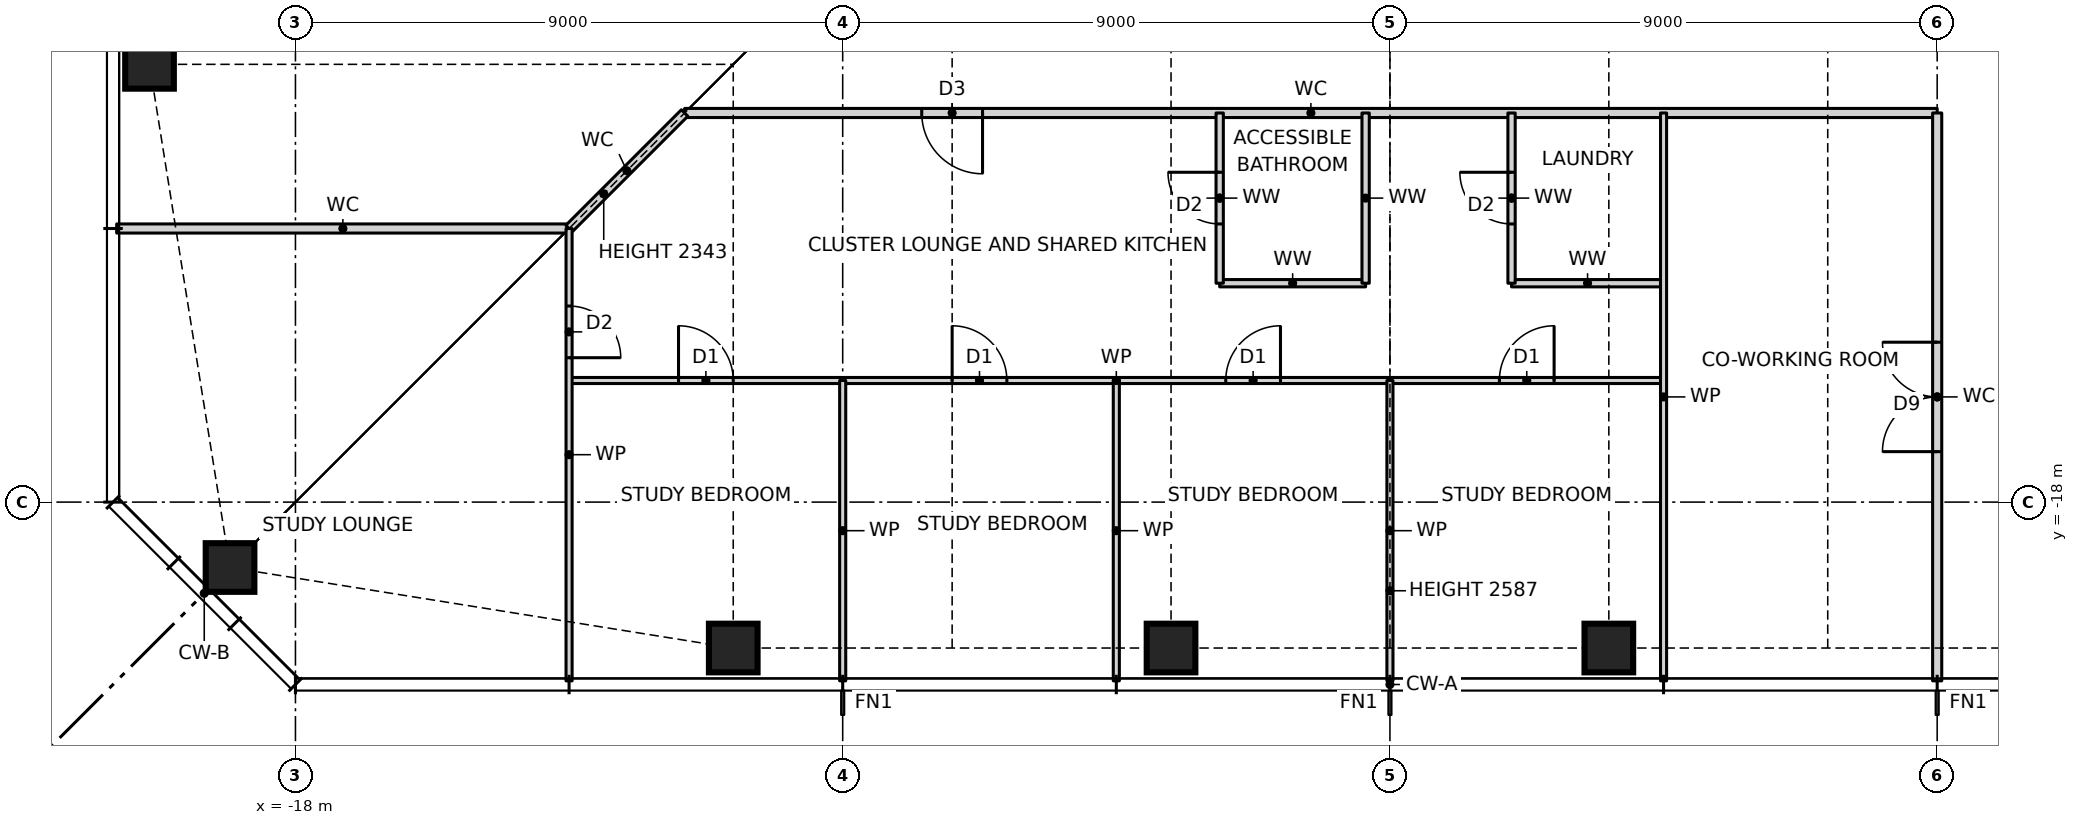
"""IFC4 building model, lengths in metres.
Left out: names, types, materials, properties, quantities, classifications, styles, units other than length and angle.
Written with IfcOpenShell. Run it as: python <this file> out.ifc"""

import sys

from ifc_helpers import new_model, si_unit, direction, frame, frame_2d, origin, origin_2d, place, context, subcontext, project, spatial, rectangle, hollow_rectangle, extrude, element, fill, save


model = new_model("IFC4")
c1 = context("Model", 3, precision=1e-05, world=origin(), true_north=direction((0.0, 1.0)))
c2 = subcontext(c1, "Body", "Model", "MODEL_VIEW")
j1 = project(units=[si_unit("LENGTHUNIT", "METRE"), si_unit("PLANEANGLEUNIT", "RADIAN")], contexts=[c1])
p1 = place(None, origin())
s1 = spatial("IfcSite", under=j1, at=p1, CompositionType="ELEMENT")
p2 = place(p1, origin())
s2 = spatial("IfcBuilding", under=s1, at=p2, CompositionType="ELEMENT")
p3 = place(p2, frame((0.0, 0.0, 122.5)))
s3 = spatial("IfcBuildingStorey", under=s2, at=p3, CompositionType="ELEMENT", Elevation=122.5)
for number, where, z_axis, x_axis in (
    (1, (-19.076, -19.076, 0.0), (0.0, 0.0, 1.0), (1.0, 0.0, 0.0)),
    (2, (-10.8, -20.4, 0.0), (0.0, 0.0, 1.0), (1.0, 0.0, 0.0)),
    (3, (-3.6, -20.4, 0.0), (0.0, 0.0, 1.0), (1.0, 0.0, 0.0)),
    (4, (3.6, -20.4, 0.0), (0.0, 0.0, 1.0), (1.0, 0.0, 0.0)),
    (5, (-20.4, -10.8, 0.0), (0.0, 0.0, 1.0), (1.0, 0.0, 0.0)),
):
    element("IfcColumn", number, at=place(p3, frame(where, z_axis=z_axis, x_axis=x_axis)), inside=s3, PredefinedType="COLUMN", context=c2, shape_type="SweptSolid", body=[
        extrude(hollow_rectangle(XDim=0.8, YDim=0.8, WallThickness=0.07, at=origin_2d()), origin(), (0.0, 0.0, 1.0), 3.5),
    ])
p4 = place(p3, frame((-13.5, -16.0, 0.0), z_axis=(0.0, 0.0, 1.0), x_axis=(1.0, 0.0, 0.0)))
e6 = element("IfcWall", 6, at=p4, inside=s3, PredefinedType="PARTITIONING", context=c2, shape_type="SweptSolid", body=[
    extrude(rectangle(XDim=18.0, YDim=0.1, at=frame_2d((9.0, 0.0))), origin(), (0.0, 0.0, 1.0), 3.27),
])
p5 = place(p4, frame((1.8, 0.0, 0.0)))
e7 = element("IfcOpeningElement", 7, at=p5, cuts=e6, PredefinedType="OPENING", context=c2, shape_type="SweptSolid", body=[
    extrude(rectangle(XDim=0.9, YDim=2.1, at=frame_2d((0.45, 1.05))), frame((0.0, 0.06, 0.0), z_axis=(0.0, -1.0, 0.0), x_axis=(1.0, 0.0, 0.0)), (0.0, 0.0, 1.0), 0.12),
])
p6 = place(p4, frame((6.3, 0.0, 0.0)))
e8 = element("IfcOpeningElement", 8, at=p6, cuts=e6, PredefinedType="OPENING", context=c2, shape_type="SweptSolid", body=[
    extrude(rectangle(XDim=0.9, YDim=2.1, at=frame_2d((0.45, 1.05))), frame((0.0, 0.06, 0.0), z_axis=(0.0, -1.0, 0.0), x_axis=(1.0, 0.0, 0.0)), (0.0, 0.0, 1.0), 0.12),
])
p7 = place(p4, frame((10.8, 0.0, 0.0)))
e9 = element("IfcOpeningElement", 9, at=p7, cuts=e6, PredefinedType="OPENING", context=c2, shape_type="SweptSolid", body=[
    extrude(rectangle(XDim=0.9, YDim=2.1, at=frame_2d((0.45, 1.05))), frame((0.0, 0.06, 0.0), z_axis=(0.0, -1.0, 0.0), x_axis=(1.0, 0.0, 0.0)), (0.0, 0.0, 1.0), 0.12),
])
p8 = place(p4, frame((15.3, 0.0, 0.0)))
e10 = element("IfcOpeningElement", 10, at=p8, cuts=e6, PredefinedType="OPENING", context=c2, shape_type="SweptSolid", body=[
    extrude(rectangle(XDim=0.9, YDim=2.1, at=frame_2d((0.45, 1.05))), frame((0.0, 0.06, 0.0), z_axis=(0.0, -1.0, 0.0), x_axis=(1.0, 0.0, 0.0)), (0.0, 0.0, 1.0), 0.12),
])
p9 = place(p3, frame((-2.8, -14.4, 0.0), z_axis=(0.0, 0.0, 1.0), x_axis=(1.0, 0.0, 0.0)))
e11 = element("IfcWall", 11, at=p9, inside=s3, PredefinedType="PARTITIONING", context=c2, shape_type="SweptSolid", body=[
    extrude(rectangle(XDim=2.4, YDim=0.12, at=frame_2d((1.2, 0.0))), origin(), (0.0, 0.0, 1.0), 3.27),
])
p10 = place(p3, frame((2.0, -14.4, 0.0), z_axis=(0.0, 0.0, 1.0), x_axis=(1.0, 0.0, 0.0)))
e12 = element("IfcWall", 12, at=p10, inside=s3, PredefinedType="PARTITIONING", context=c2, shape_type="SweptSolid", body=[
    extrude(rectangle(XDim=2.5, YDim=0.12, at=frame_2d((1.25, 0.0))), origin(), (0.0, 0.0, 1.0), 3.27),
])
p11 = place(p3, frame((-20.94, -13.5, 0.0), z_axis=(0.0, 0.0, 1.0), x_axis=(1.0, 0.0, 0.0)))
e13 = element("IfcWall", 13, at=p11, inside=s3, PredefinedType="PARTITIONING", context=c2, shape_type="SweptSolid", body=[
    extrude(rectangle(XDim=7.44, YDim=0.15, at=frame_2d((3.72, 0.0))), origin(), (0.0, 0.0, 1.0), 3.27),
])
p12 = place(p3, frame((-11.6, -11.6, 0.0), z_axis=(0.0, 0.0, 1.0), x_axis=(1.0, 0.0, 0.0)))
e14 = element("IfcWall", 14, at=p12, inside=s3, PredefinedType="PARTITIONING", context=c2, shape_type="SweptSolid", body=[
    extrude(rectangle(XDim=20.6, YDim=0.15, at=frame_2d((10.3, 0.0))), origin(), (0.0, 0.0, 1.0), 3.27),
])
p13 = place(p12, frame((3.9, 0.0, 0.0)))
e15 = element("IfcOpeningElement", 15, at=p13, cuts=e14, PredefinedType="OPENING", context=c2, shape_type="SweptSolid", body=[
    extrude(rectangle(XDim=1.0, YDim=2.1, at=frame_2d((0.5, 1.05))), frame((0.0, 0.085, 0.0), z_axis=(0.0, -1.0, 0.0), x_axis=(1.0, 0.0, 0.0)), (0.0, 0.0, 1.0), 0.17),
])
p14 = place(p3, frame((-13.5, -13.5, 0.0), z_axis=(0.0, 0.0, 1.0), x_axis=(0.707106781187, 0.707106781187, 0.0)))
e16 = element("IfcWall", 16, at=p14, inside=s3, PredefinedType="PARTITIONING", context=c2, shape_type="SweptSolid", body=[
    extrude(rectangle(XDim=2.687, YDim=0.15, at=frame_2d((1.343, 0.0))), origin(), (0.0, 0.0, 1.0), 2.343),
])
p15 = place(p3, frame((9.0, -20.94, 0.0), z_axis=(0.0, 0.0, 1.0), x_axis=(0.0, 1.0, 0.0)))
e17 = element("IfcWall", 17, at=p15, inside=s3, PredefinedType="PARTITIONING", context=c2, shape_type="SweptSolid", body=[
    extrude(rectangle(XDim=9.34, YDim=0.15, at=frame_2d((4.67, 0.0))), origin(), (0.0, 0.0, 1.0), 3.27),
])
p16 = place(p15, frame((3.77, 0.0, 0.0)))
e18 = element("IfcOpeningElement", 18, at=p16, cuts=e17, PredefinedType="OPENING", context=c2, shape_type="SweptSolid", body=[
    extrude(rectangle(XDim=1.8, YDim=2.1, at=frame_2d((0.9, 1.05))), frame((0.0, 0.085, 0.0), z_axis=(0.0, -1.0, 0.0), x_axis=(1.0, 0.0, 0.0)), (0.0, 0.0, 1.0), 0.17),
])
p17 = place(p3, frame((4.5, -20.94, 0.0), z_axis=(0.0, 0.0, 1.0), x_axis=(0.0, 1.0, 0.0)))
e19 = element("IfcWall", 19, at=p17, inside=s3, PredefinedType="PARTITIONING", context=c2, shape_type="SweptSolid", body=[
    extrude(rectangle(XDim=9.34, YDim=0.1, at=frame_2d((4.67, 0.0))), origin(), (0.0, 0.0, 1.0), 3.27),
])
p18 = place(p3, frame((2.0, -14.4, 0.0), z_axis=(0.0, 0.0, 1.0), x_axis=(0.0, 1.0, 0.0)))
e20 = element("IfcWall", 20, at=p18, inside=s3, PredefinedType="PARTITIONING", context=c2, shape_type="SweptSolid", body=[
    extrude(rectangle(XDim=2.8, YDim=0.12, at=frame_2d((1.4, 0.0))), origin(), (0.0, 0.0, 1.0), 3.27),
])
p19 = place(p18, frame((0.975, 0.0, 0.0)))
e21 = element("IfcOpeningElement", 21, at=p19, cuts=e20, PredefinedType="OPENING", context=c2, shape_type="SweptSolid", body=[
    extrude(rectangle(XDim=0.85, YDim=2.1, at=frame_2d((0.425, 1.05))), frame((0.0, 0.07, 0.0), z_axis=(0.0, -1.0, 0.0), x_axis=(1.0, 0.0, 0.0)), (0.0, 0.0, 1.0), 0.14),
])
p20 = place(p3, frame((0.0, -20.94, 0.0), z_axis=(0.0, 0.0, 1.0), x_axis=(0.0, 1.0, 0.0)))
e22 = element("IfcWall", 22, at=p20, inside=s3, PredefinedType="PARTITIONING", context=c2, shape_type="SweptSolid", body=[
    extrude(rectangle(XDim=4.94, YDim=0.1, at=frame_2d((2.47, 0.0))), origin(), (0.0, 0.0, 1.0), 2.587),
])
p21 = place(p3, frame((-0.4, -14.4, 0.0), z_axis=(0.0, 0.0, 1.0), x_axis=(0.0, 1.0, 0.0)))
e23 = element("IfcWall", 23, at=p21, inside=s3, PredefinedType="PARTITIONING", context=c2, shape_type="SweptSolid", body=[
    extrude(rectangle(XDim=2.8, YDim=0.12, at=frame_2d((1.4, 0.0))), origin(), (0.0, 0.0, 1.0), 3.27),
])
p22 = place(p3, frame((-2.8, -14.4, 0.0), z_axis=(0.0, 0.0, 1.0), x_axis=(0.0, 1.0, 0.0)))
e24 = element("IfcWall", 24, at=p22, inside=s3, PredefinedType="PARTITIONING", context=c2, shape_type="SweptSolid", body=[
    extrude(rectangle(XDim=2.8, YDim=0.12, at=frame_2d((1.4, 0.0))), origin(), (0.0, 0.0, 1.0), 3.27),
])
p23 = place(p22, frame((0.975, 0.0, 0.0)))
e25 = element("IfcOpeningElement", 25, at=p23, cuts=e24, PredefinedType="OPENING", context=c2, shape_type="SweptSolid", body=[
    extrude(rectangle(XDim=0.85, YDim=2.1, at=frame_2d((0.425, 1.05))), frame((0.0, 0.07, 0.0), z_axis=(0.0, -1.0, 0.0), x_axis=(1.0, 0.0, 0.0)), (0.0, 0.0, 1.0), 0.14),
])
for number, where, z_axis, x_axis in (
    (26, (-4.5, -20.94, 0.0), (0.0, 0.0, 1.0), (0.0, 1.0, 0.0)),
    (27, (-9.0, -20.94, 0.0), (0.0, 0.0, 1.0), (0.0, 1.0, 0.0)),
):
    element("IfcWall", number, at=place(p3, frame(where, z_axis=z_axis, x_axis=x_axis)), inside=s3, PredefinedType="PARTITIONING", context=c2, shape_type="SweptSolid", body=[
        extrude(rectangle(XDim=4.94, YDim=0.1, at=frame_2d((2.47, 0.0))), origin(), (0.0, 0.0, 1.0), 3.27),
    ])
p24 = place(p3, frame((-13.5, -20.94, 0.0), z_axis=(0.0, 0.0, 1.0), x_axis=(0.0, 1.0, 0.0)))
e28 = element("IfcWall", 28, at=p24, inside=s3, PredefinedType="PARTITIONING", context=c2, shape_type="SweptSolid", body=[
    extrude(rectangle(XDim=7.44, YDim=0.1, at=frame_2d((3.72, 0.0))), origin(), (0.0, 0.0, 1.0), 3.27),
])
p25 = place(p24, frame((5.315, 0.0, 0.0)))
e29 = element("IfcOpeningElement", 29, at=p25, cuts=e28, PredefinedType="OPENING", context=c2, shape_type="SweptSolid", body=[
    extrude(rectangle(XDim=0.85, YDim=2.1, at=frame_2d((0.425, 1.05))), frame((0.0, 0.06, 0.0), z_axis=(0.0, -1.0, 0.0), x_axis=(1.0, 0.0, 0.0)), (0.0, 0.0, 1.0), 0.12),
])
p26 = place(p5, origin())
e30 = element("IfcDoor", 30, at=p26, inside=s3, OperationType="SINGLE_SWING_LEFT", PredefinedType="DOOR", context=c2, shape_type="SweptSolid", body=[
    extrude(rectangle(XDim=0.9, YDim=2.1, at=frame_2d((0.45, 1.05))), frame((0.0, 0.025, 0.0), z_axis=(0.0, -1.0, 0.0), x_axis=(1.0, 0.0, 0.0)), (0.0, 0.0, 1.0), 0.05),
])
fill(e7, e30)
p27 = place(p6, origin())
e31 = element("IfcDoor", 31, at=p27, inside=s3, OperationType="SINGLE_SWING_LEFT", PredefinedType="DOOR", context=c2, shape_type="SweptSolid", body=[
    extrude(rectangle(XDim=0.9, YDim=2.1, at=frame_2d((0.45, 1.05))), frame((0.0, 0.025, 0.0), z_axis=(0.0, -1.0, 0.0), x_axis=(1.0, 0.0, 0.0)), (0.0, 0.0, 1.0), 0.05),
])
fill(e8, e31)
p28 = place(p7, origin())
e32 = element("IfcDoor", 32, at=p28, inside=s3, OperationType="SINGLE_SWING_RIGHT", PredefinedType="DOOR", context=c2, shape_type="SweptSolid", body=[
    extrude(rectangle(XDim=0.9, YDim=2.1, at=frame_2d((0.45, 1.05))), frame((0.0, 0.025, 0.0), z_axis=(0.0, -1.0, 0.0), x_axis=(1.0, 0.0, 0.0)), (0.0, 0.0, 1.0), 0.05),
])
fill(e9, e32)
p29 = place(p8, origin())
e33 = element("IfcDoor", 33, at=p29, inside=s3, OperationType="SINGLE_SWING_RIGHT", PredefinedType="DOOR", context=c2, shape_type="SweptSolid", body=[
    extrude(rectangle(XDim=0.9, YDim=2.1, at=frame_2d((0.45, 1.05))), frame((0.0, 0.025, 0.0), z_axis=(0.0, -1.0, 0.0), x_axis=(1.0, 0.0, 0.0)), (0.0, 0.0, 1.0), 0.05),
])
fill(e10, e33)
p30 = place(p13, frame((1.0, 0.0, 0.0), z_axis=(0.0, 0.0, 1.0), x_axis=(-1.0, 0.0, 0.0)))
e34 = element("IfcDoor", 34, at=p30, inside=s3, OperationType="SINGLE_SWING_LEFT", PredefinedType="DOOR", context=c2, shape_type="SweptSolid", body=[
    extrude(rectangle(XDim=1.0, YDim=2.1, at=frame_2d((0.5, 1.05))), frame((0.0, 0.025, 0.0), z_axis=(0.0, -1.0, 0.0), x_axis=(1.0, 0.0, 0.0)), (0.0, 0.0, 1.0), 0.05),
])
fill(e15, e34)
p31 = place(p23, origin())
e35 = element("IfcDoor", 35, at=p31, inside=s3, OperationType="SINGLE_SWING_RIGHT", PredefinedType="DOOR", context=c2, shape_type="SweptSolid", body=[
    extrude(rectangle(XDim=0.85, YDim=2.1, at=frame_2d((0.425, 1.05))), frame((0.0, 0.025, 0.0), z_axis=(0.0, -1.0, 0.0), x_axis=(1.0, 0.0, 0.0)), (0.0, 0.0, 1.0), 0.05),
])
fill(e25, e35)
p32 = place(p19, origin())
e36 = element("IfcDoor", 36, at=p32, inside=s3, OperationType="SINGLE_SWING_RIGHT", PredefinedType="DOOR", context=c2, shape_type="SweptSolid", body=[
    extrude(rectangle(XDim=0.85, YDim=2.1, at=frame_2d((0.425, 1.05))), frame((0.0, 0.025, 0.0), z_axis=(0.0, -1.0, 0.0), x_axis=(1.0, 0.0, 0.0)), (0.0, 0.0, 1.0), 0.05),
])
fill(e21, e36)
p33 = place(p16, origin())
e37 = element("IfcDoor", 37, at=p33, inside=s3, OperationType="DOUBLE_DOOR_SINGLE_SWING", PredefinedType="DOOR", context=c2, shape_type="SweptSolid", body=[
    extrude(rectangle(XDim=1.8, YDim=2.1, at=frame_2d((0.9, 1.05))), frame((0.0, 0.025, 0.0), z_axis=(0.0, -1.0, 0.0), x_axis=(1.0, 0.0, 0.0)), (0.0, 0.0, 1.0), 0.05),
])
fill(e18, e37)
p34 = place(p25, frame((0.85, 0.0, 0.0), z_axis=(0.0, 0.0, 1.0), x_axis=(-1.0, 0.0, 0.0)))
e38 = element("IfcDoor", 38, at=p34, inside=s3, OperationType="SINGLE_SWING_RIGHT", PredefinedType="DOOR", context=c2, shape_type="SweptSolid", body=[
    extrude(rectangle(XDim=0.85, YDim=2.1, at=frame_2d((0.425, 1.05))), frame((0.0, 0.025, 0.0), z_axis=(0.0, -1.0, 0.0), x_axis=(1.0, 0.0, 0.0)), (0.0, 0.0, 1.0), 0.05),
])
fill(e29, e38)
save(model, sys.argv[1])
